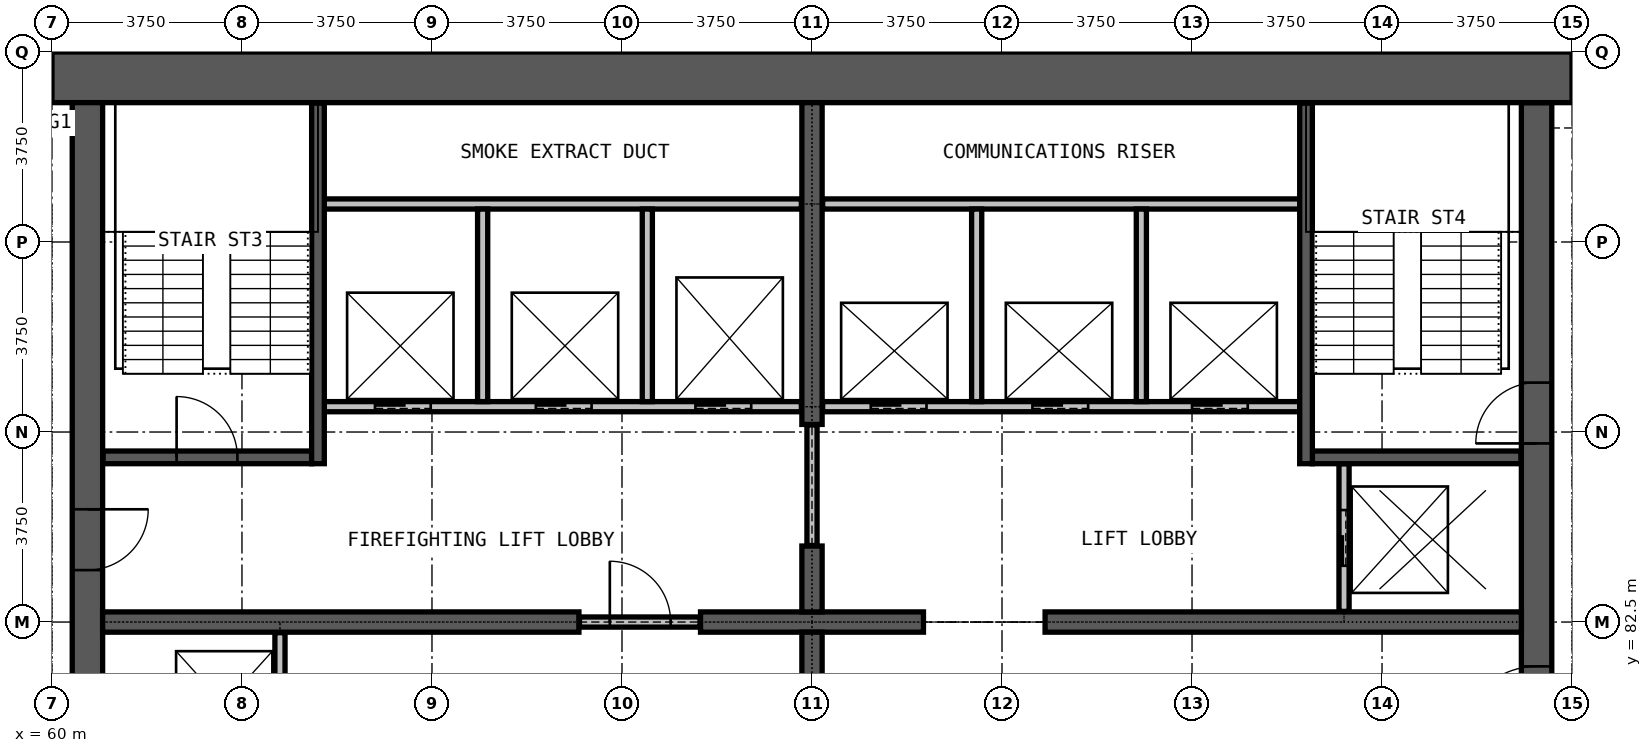
"""IFC4 building model, lengths in metres.
Left out: names, types, materials, properties, quantities, classifications, styles, units other than length and angle.
Written with IfcOpenShell. Run it as: python <this file> out.ifc"""

import sys

from ifc_helpers import new_model, si_unit, direction, frame, frame_2d, origin, place, context, subcontext, project, spatial, rectangle, extrude, element, fill, save


model = new_model("IFC4")
c1 = context("Model", 3, precision=1e-05, world=origin(), true_north=direction((0.0, 1.0)))
c2 = subcontext(c1, "Body", "Model", "MODEL_VIEW")
j1 = project(units=[si_unit("LENGTHUNIT", "METRE"), si_unit("PLANEANGLEUNIT", "RADIAN")], contexts=[c1])
p1 = place(None, origin())
s1 = spatial("IfcSite", under=j1, at=p1, CompositionType="ELEMENT")
p2 = place(p1, origin())
s2 = spatial("IfcBuilding", under=s1, at=p2, CompositionType="ELEMENT")
p3 = place(p2, frame((0.0, 0.0, 203.1)))
s3 = spatial("IfcBuildingStorey", under=s2, at=p3, CompositionType="ELEMENT", Elevation=203.1)
p4 = place(p3, frame((89.3, 72.25, 0.0), z_axis=(0.0, 0.0, 1.0), x_axis=(0.0, 1.0, 0.0)))
e1 = element("IfcWall", 1, at=p4, inside=s3, PredefinedType="SHEAR", context=c2, shape_type="SweptSolid", body=[
    extrude(rectangle(XDim=20.5, YDim=0.6, at=frame_2d((10.25, 0.0))), origin(), (0.0, 0.0, 1.0), 3.6),
])
p5 = place(p4, frame((0.275, 0.0, 0.0)))
e2 = element("IfcOpeningElement", 2, at=p5, cuts=e1, PredefinedType="OPENING", context=c2, shape_type="SweptSolid", body=[
    extrude(rectangle(XDim=1.2, YDim=2.2, at=frame_2d((0.6, 1.1))), frame((0.0, 0.31, 0.0), z_axis=(0.0, -1.0, 0.0), x_axis=(1.0, 0.0, 0.0)), (0.0, 0.0, 1.0), 0.62),
])
p6 = place(p4, frame((13.775, 0.0, 0.0)))
e3 = element("IfcOpeningElement", 3, at=p6, cuts=e1, PredefinedType="OPENING", context=c2, shape_type="SweptSolid", body=[
    extrude(rectangle(XDim=1.2, YDim=2.2, at=frame_2d((0.6, 1.1))), frame((0.0, 0.31, 0.0), z_axis=(0.0, -1.0, 0.0), x_axis=(1.0, 0.0, 0.0)), (0.0, 0.0, 1.0), 0.62),
])
p7 = place(p4, frame((7.875, 0.0, 0.0)))
e4 = element("IfcOpeningElement", 4, at=p7, cuts=e1, PredefinedType="OPENING", context=c2, shape_type="SweptSolid", body=[
    extrude(rectangle(XDim=1.5, YDim=2.2, at=frame_2d((0.75, 1.1))), frame((0.0, 0.31, 0.0), z_axis=(0.0, -1.0, 0.0), x_axis=(1.0, 0.0, 0.0)), (0.0, 0.0, 1.0), 0.62),
])
p8 = place(p3, frame((90.0, 93.25, 0.0), z_axis=(0.0, 0.0, 1.0), x_axis=(-1.0, 0.0, 0.0)))
e5 = element("IfcWall", 5, at=p8, inside=s3, PredefinedType="SHEAR", context=c2, shape_type="SweptSolid", body=[
    extrude(rectangle(XDim=30.0, YDim=1.0, at=frame_2d((15.0, 0.0))), origin(), (0.0, 0.0, 1.0), 3.6),
])
p9 = place(p3, frame((60.7, 92.75, 0.0), z_axis=(0.0, 0.0, 1.0), x_axis=(0.0, -1.0, 0.0)))
e6 = element("IfcWall", 6, at=p9, inside=s3, PredefinedType="SHEAR", context=c2, shape_type="SweptSolid", body=[
    extrude(rectangle(XDim=20.5, YDim=0.6, at=frame_2d((10.25, 0.0))), origin(), (0.0, 0.0, 1.0), 3.6),
])
p10 = place(p9, frame((19.025, 0.0, 0.0)))
e7 = element("IfcOpeningElement", 7, at=p10, cuts=e6, PredefinedType="OPENING", context=c2, shape_type="SweptSolid", body=[
    extrude(rectangle(XDim=1.2, YDim=2.2, at=frame_2d((0.6, 1.1))), frame((0.0, 0.31, 0.0), z_axis=(0.0, -1.0, 0.0), x_axis=(1.0, 0.0, 0.0)), (0.0, 0.0, 1.0), 0.62),
])
p11 = place(p9, frame((8.025, 0.0, 0.0)))
e8 = element("IfcOpeningElement", 8, at=p11, cuts=e6, PredefinedType="OPENING", context=c2, shape_type="SweptSolid", body=[
    extrude(rectangle(XDim=1.2, YDim=2.2, at=frame_2d((0.6, 1.1))), frame((0.0, 0.31, 0.0), z_axis=(0.0, -1.0, 0.0), x_axis=(1.0, 0.0, 0.0)), (0.0, 0.0, 1.0), 0.62),
])
p12 = place(p3, frame((61.0, 82.5, 0.0), z_axis=(0.0, 0.0, 1.0), x_axis=(1.0, 0.0, 0.0)))
e9 = element("IfcWall", 9, at=p12, inside=s3, PredefinedType="SHEAR", context=c2, shape_type="SweptSolid", body=[
    extrude(rectangle(XDim=9.4, YDim=0.4, at=frame_2d((4.7, 0.0))), origin(), (0.0, 0.0, 1.0), 3.6),
])
p13 = place(p3, frame((72.8, 82.5, 0.0), z_axis=(0.0, 0.0, 1.0), x_axis=(1.0, 0.0, 0.0)))
e10 = element("IfcWall", 10, at=p13, inside=s3, PredefinedType="SHEAR", context=c2, shape_type="SweptSolid", body=[
    extrude(rectangle(XDim=4.4, YDim=0.4, at=frame_2d((2.2, 0.0))), origin(), (0.0, 0.0, 1.0), 3.6),
])
p14 = place(p3, frame((79.6, 82.5, 0.0), z_axis=(0.0, 0.0, 1.0), x_axis=(1.0, 0.0, 0.0)))
e11 = element("IfcWall", 11, at=p14, inside=s3, PredefinedType="SHEAR", context=c2, shape_type="SweptSolid", body=[
    extrude(rectangle(XDim=9.4, YDim=0.4, at=frame_2d((4.7, 0.0))), origin(), (0.0, 0.0, 1.0), 3.6),
])
for number, where, z_axis, x_axis in (
    (12, (75.0, 81.0, 0.0), (0.0, 0.0, 1.0), (0.0, 1.0, 0.0)),
    (13, (75.0, 82.7, 0.0), (0.0, 0.0, 1.0), (0.0, 1.0, 0.0)),
):
    element("IfcWall", number, at=place(p3, frame(where, z_axis=z_axis, x_axis=x_axis)), inside=s3, PredefinedType="SHEAR", context=c2, shape_type="SweptSolid", body=[
        extrude(rectangle(XDim=1.3, YDim=0.4, at=frame_2d((0.65, 0.0))), origin(), (0.0, 0.0, 1.0), 3.6),
    ])
p15 = place(p3, frame((75.0, 86.4, 0.0), z_axis=(0.0, 0.0, 1.0), x_axis=(0.0, 1.0, 0.0)))
e14 = element("IfcWall", 14, at=p15, inside=s3, PredefinedType="SHEAR", context=c2, shape_type="SweptSolid", body=[
    extrude(rectangle(XDim=6.35, YDim=0.4, at=frame_2d((3.175, 0.0))), origin(), (0.0, 0.0, 1.0), 3.6),
])
p16 = place(p3, frame((70.41, 82.5, 0.0), z_axis=(0.0, 0.0, 1.0), x_axis=(1.0, 0.0, 0.0)))
e15 = element("IfcWall", 15, at=p16, inside=s3, PredefinedType="PARTITIONING", context=c2, shape_type="SweptSolid", body=[
    extrude(rectangle(XDim=2.38, YDim=0.2, at=frame_2d((1.19, 0.0))), origin(), (0.0, 0.0, 1.0), 2.4),
])
p17 = place(p16, frame((0.6, 0.0, 0.0)))
e16 = element("IfcOpeningElement", 16, at=p17, cuts=e15, PredefinedType="OPENING", context=c2, shape_type="SweptSolid", body=[
    extrude(rectangle(XDim=1.2, YDim=2.2, at=frame_2d((0.6, 1.1))), frame((0.0, 0.11, 0.0), z_axis=(0.0, -1.0, 0.0), x_axis=(1.0, 0.0, 0.0)), (0.0, 0.0, 1.0), 0.22),
])
p18 = place(p3, frame((75.0, 84.01, 0.0), z_axis=(0.0, 0.0, 1.0), x_axis=(0.0, 1.0, 0.0)))
e17 = element("IfcWall", 17, at=p18, inside=s3, PredefinedType="PARTITIONING", context=c2, shape_type="SweptSolid", body=[
    extrude(rectangle(XDim=2.38, YDim=0.2, at=frame_2d((1.19, 0.0))), origin(), (0.0, 0.0, 1.0), 2.4),
])
p19 = place(p3, frame((65.375, 86.75, 0.0), z_axis=(0.0, 0.0, 1.0), x_axis=(1.0, 0.0, 0.0)))
e18 = element("IfcWall", 18, at=p19, inside=s3, PredefinedType="PARTITIONING", context=c2, shape_type="SweptSolid", body=[
    extrude(rectangle(XDim=9.415, YDim=0.2, at=frame_2d((4.708, 0.0))), origin(), (0.0, 0.0, 1.0), 3.3),
])
p20 = place(p19, frame((1.0, 0.0, 0.0)))
e19 = element("IfcOpeningElement", 19, at=p20, cuts=e18, PredefinedType="OPENING", context=c2, shape_type="SweptSolid", body=[
    extrude(rectangle(XDim=1.1, YDim=2.2, at=frame_2d((0.55, 1.1))), frame((0.0, 0.11, 0.0), z_axis=(0.0, -1.0, 0.0), x_axis=(1.0, 0.0, 0.0)), (0.0, 0.0, 1.0), 0.22),
])
p21 = place(p19, frame((4.175, 0.0, 0.0)))
e20 = element("IfcOpeningElement", 20, at=p21, cuts=e18, PredefinedType="OPENING", context=c2, shape_type="SweptSolid", body=[
    extrude(rectangle(XDim=1.1, YDim=2.2, at=frame_2d((0.55, 1.1))), frame((0.0, 0.11, 0.0), z_axis=(0.0, -1.0, 0.0), x_axis=(1.0, 0.0, 0.0)), (0.0, 0.0, 1.0), 0.22),
])
p22 = place(p19, frame((7.325, 0.0, 0.0)))
e21 = element("IfcOpeningElement", 21, at=p22, cuts=e18, PredefinedType="OPENING", context=c2, shape_type="SweptSolid", body=[
    extrude(rectangle(XDim=1.1, YDim=2.2, at=frame_2d((0.55, 1.1))), frame((0.0, 0.11, 0.0), z_axis=(0.0, -1.0, 0.0), x_axis=(1.0, 0.0, 0.0)), (0.0, 0.0, 1.0), 0.22),
])
p23 = place(p3, frame((75.21, 86.75, 0.0), z_axis=(0.0, 0.0, 1.0), x_axis=(1.0, 0.0, 0.0)))
e22 = element("IfcWall", 22, at=p23, inside=s3, PredefinedType="PARTITIONING", context=c2, shape_type="SweptSolid", body=[
    extrude(rectangle(XDim=9.415, YDim=0.2, at=frame_2d((4.708, 0.0))), origin(), (0.0, 0.0, 1.0), 3.3),
])
p24 = place(p23, frame((0.95, 0.0, 0.0)))
e23 = element("IfcOpeningElement", 23, at=p24, cuts=e22, PredefinedType="OPENING", context=c2, shape_type="SweptSolid", body=[
    extrude(rectangle(XDim=1.1, YDim=2.2, at=frame_2d((0.55, 1.1))), frame((0.0, 0.11, 0.0), z_axis=(0.0, -1.0, 0.0), x_axis=(1.0, 0.0, 0.0)), (0.0, 0.0, 1.0), 0.22),
])
p25 = place(p23, frame((4.14, 0.0, 0.0)))
e24 = element("IfcOpeningElement", 24, at=p25, cuts=e22, PredefinedType="OPENING", context=c2, shape_type="SweptSolid", body=[
    extrude(rectangle(XDim=1.1, YDim=2.2, at=frame_2d((0.55, 1.1))), frame((0.0, 0.11, 0.0), z_axis=(0.0, -1.0, 0.0), x_axis=(1.0, 0.0, 0.0)), (0.0, 0.0, 1.0), 0.22),
])
p26 = place(p23, frame((7.29, 0.0, 0.0)))
e25 = element("IfcOpeningElement", 25, at=p26, cuts=e22, PredefinedType="OPENING", context=c2, shape_type="SweptSolid", body=[
    extrude(rectangle(XDim=1.1, YDim=2.2, at=frame_2d((0.55, 1.1))), frame((0.0, 0.11, 0.0), z_axis=(0.0, -1.0, 0.0), x_axis=(1.0, 0.0, 0.0)), (0.0, 0.0, 1.0), 0.22),
])
for number, where, z_axis, x_axis in (
    (26, (65.375, 90.75, 0.0), (0.0, 0.0, 1.0), (1.0, 0.0, 0.0)),
    (27, (75.21, 90.75, 0.0), (0.0, 0.0, 1.0), (1.0, 0.0, 0.0)),
):
    element("IfcWall", number, at=place(p3, frame(where, z_axis=z_axis, x_axis=x_axis)), inside=s3, PredefinedType="PARTITIONING", context=c2, shape_type="SweptSolid", body=[
        extrude(rectangle(XDim=9.415, YDim=0.2, at=frame_2d((4.708, 0.0))), origin(), (0.0, 0.0, 1.0), 3.3),
    ])
p27 = place(p3, frame((64.5, 79.375, 0.0), z_axis=(0.0, 0.0, 1.0), x_axis=(0.0, 1.0, 0.0)))
e28 = element("IfcWall", 28, at=p27, inside=s3, PredefinedType="PARTITIONING", context=c2, shape_type="SweptSolid", body=[
    extrude(rectangle(XDim=2.915, YDim=0.2, at=frame_2d((1.458, 0.0))), origin(), (0.0, 0.0, 1.0), 3.3),
])
for number, where, z_axis, x_axis in (
    (29, (68.5, 86.85, 0.0), (0.0, 0.0, 1.0), (0.0, 1.0, 0.0)),
    (30, (71.75, 86.85, 0.0), (0.0, 0.0, 1.0), (0.0, 1.0, 0.0)),
    (31, (78.25, 86.85, 0.0), (0.0, 0.0, 1.0), (0.0, 1.0, 0.0)),
    (32, (81.5, 86.85, 0.0), (0.0, 0.0, 1.0), (0.0, 1.0, 0.0)),
):
    element("IfcWall", number, at=place(p3, frame(where, z_axis=z_axis, x_axis=x_axis)), inside=s3, PredefinedType="PARTITIONING", context=c2, shape_type="SweptSolid", body=[
        extrude(rectangle(XDim=3.8, YDim=0.2, at=frame_2d((1.9, 0.0))), origin(), (0.0, 0.0, 1.0), 3.3),
    ])
p28 = place(p3, frame((85.5, 82.71, 0.0), z_axis=(0.0, 0.0, 1.0), x_axis=(0.0, 1.0, 0.0)))
e33 = element("IfcWall", 33, at=p28, inside=s3, PredefinedType="PARTITIONING", context=c2, shape_type="SweptSolid", body=[
    extrude(rectangle(XDim=2.915, YDim=0.2, at=frame_2d((1.458, 0.0))), origin(), (0.0, 0.0, 1.0), 3.3),
])
p29 = place(p28, frame((0.9, 0.0, 0.0)))
e34 = element("IfcOpeningElement", 34, at=p29, cuts=e33, PredefinedType="OPENING", context=c2, shape_type="SweptSolid", body=[
    extrude(rectangle(XDim=1.1, YDim=2.2, at=frame_2d((0.55, 1.1))), frame((0.0, 0.11, 0.0), z_axis=(0.0, -1.0, 0.0), x_axis=(1.0, 0.0, 0.0)), (0.0, 0.0, 1.0), 0.22),
])
p30 = place(p3, frame((61.01, 85.75, 0.0), z_axis=(0.0, 0.0, 1.0), x_axis=(1.0, 0.0, 0.0)))
e35 = element("IfcWall", 35, at=p30, inside=s3, PredefinedType="PARTITIONING", context=c2, shape_type="SweptSolid", body=[
    extrude(rectangle(XDim=4.115, YDim=0.25, at=frame_2d((2.058, 0.0))), origin(), (0.0, 0.0, 1.0), 3.3),
])
p31 = place(p30, frame((1.45, 0.0, 0.0)))
e36 = element("IfcOpeningElement", 36, at=p31, cuts=e35, PredefinedType="OPENING", context=c2, shape_type="SweptSolid", body=[
    extrude(rectangle(XDim=1.2, YDim=2.2, at=frame_2d((0.6, 1.1))), frame((0.0, 0.135, 0.0), z_axis=(0.0, -1.0, 0.0), x_axis=(1.0, 0.0, 0.0)), (0.0, 0.0, 1.0), 0.27),
])
p32 = place(p3, frame((84.875, 85.75, 0.0), z_axis=(0.0, 0.0, 1.0), x_axis=(1.0, 0.0, 0.0)))
e37 = element("IfcWall", 37, at=p32, inside=s3, PredefinedType="PARTITIONING", context=c2, shape_type="SweptSolid", body=[
    extrude(rectangle(XDim=4.115, YDim=0.25, at=frame_2d((2.058, 0.0))), origin(), (0.0, 0.0, 1.0), 3.3),
])
for number, where, z_axis, x_axis in (
    (38, (65.25, 85.625, 0.0), (0.0, 0.0, 1.0), (0.0, 1.0, 0.0)),
    (39, (84.75, 85.625, 0.0), (0.0, 0.0, 1.0), (0.0, 1.0, 0.0)),
):
    element("IfcWall", number, at=place(p3, frame(where, z_axis=z_axis, x_axis=x_axis)), inside=s3, PredefinedType="PARTITIONING", context=c2, shape_type="SweptSolid", body=[
        extrude(rectangle(XDim=7.115, YDim=0.25, at=frame_2d((3.558, 0.0))), origin(), (0.0, 0.0, 1.0), 3.3),
    ])
p33 = place(p24, origin())
e40 = element("IfcDoor", 40, at=p33, inside=s3, OperationType="DOUBLE_DOOR_SLIDING", PredefinedType="DOOR", context=c2, shape_type="SweptSolid", body=[
    extrude(rectangle(XDim=1.1, YDim=2.2, at=frame_2d((0.55, 1.1))), frame((0.0, 0.025, 0.0), z_axis=(0.0, -1.0, 0.0), x_axis=(1.0, 0.0, 0.0)), (0.0, 0.0, 1.0), 0.05),
])
fill(e23, e40)
p34 = place(p25, origin())
e41 = element("IfcDoor", 41, at=p34, inside=s3, OperationType="DOUBLE_DOOR_SLIDING", PredefinedType="DOOR", context=c2, shape_type="SweptSolid", body=[
    extrude(rectangle(XDim=1.1, YDim=2.2, at=frame_2d((0.55, 1.1))), frame((0.0, 0.025, 0.0), z_axis=(0.0, -1.0, 0.0), x_axis=(1.0, 0.0, 0.0)), (0.0, 0.0, 1.0), 0.05),
])
fill(e24, e41)
p35 = place(p26, origin())
e42 = element("IfcDoor", 42, at=p35, inside=s3, OperationType="DOUBLE_DOOR_SLIDING", PredefinedType="DOOR", context=c2, shape_type="SweptSolid", body=[
    extrude(rectangle(XDim=1.1, YDim=2.2, at=frame_2d((0.55, 1.1))), frame((0.0, 0.025, 0.0), z_axis=(0.0, -1.0, 0.0), x_axis=(1.0, 0.0, 0.0)), (0.0, 0.0, 1.0), 0.05),
])
fill(e25, e42)
p36 = place(p20, origin())
e43 = element("IfcDoor", 43, at=p36, inside=s3, OperationType="DOUBLE_DOOR_SLIDING", PredefinedType="DOOR", context=c2, shape_type="SweptSolid", body=[
    extrude(rectangle(XDim=1.1, YDim=2.2, at=frame_2d((0.55, 1.1))), frame((0.0, 0.025, 0.0), z_axis=(0.0, -1.0, 0.0), x_axis=(1.0, 0.0, 0.0)), (0.0, 0.0, 1.0), 0.05),
])
fill(e19, e43)
p37 = place(p21, origin())
e44 = element("IfcDoor", 44, at=p37, inside=s3, OperationType="DOUBLE_DOOR_SLIDING", PredefinedType="DOOR", context=c2, shape_type="SweptSolid", body=[
    extrude(rectangle(XDim=1.1, YDim=2.2, at=frame_2d((0.55, 1.1))), frame((0.0, 0.025, 0.0), z_axis=(0.0, -1.0, 0.0), x_axis=(1.0, 0.0, 0.0)), (0.0, 0.0, 1.0), 0.05),
])
fill(e20, e44)
p38 = place(p22, origin())
e45 = element("IfcDoor", 45, at=p38, inside=s3, OperationType="DOUBLE_DOOR_SLIDING", PredefinedType="DOOR", context=c2, shape_type="SweptSolid", body=[
    extrude(rectangle(XDim=1.1, YDim=2.2, at=frame_2d((0.55, 1.1))), frame((0.0, 0.025, 0.0), z_axis=(0.0, -1.0, 0.0), x_axis=(1.0, 0.0, 0.0)), (0.0, 0.0, 1.0), 0.05),
])
fill(e21, e45)
p39 = place(p29, origin())
e46 = element("IfcDoor", 46, at=p39, inside=s3, OperationType="DOUBLE_DOOR_SLIDING", PredefinedType="DOOR", context=c2, shape_type="SweptSolid", body=[
    extrude(rectangle(XDim=1.1, YDim=2.2, at=frame_2d((0.55, 1.1))), frame((0.0, 0.025, 0.0), z_axis=(0.0, -1.0, 0.0), x_axis=(1.0, 0.0, 0.0)), (0.0, 0.0, 1.0), 0.05),
])
fill(e34, e46)
p40 = place(p17, origin())
e47 = element("IfcDoor", 47, at=p40, inside=s3, OperationType="SINGLE_SWING_LEFT", PredefinedType="DOOR", context=c2, shape_type="SweptSolid", body=[
    extrude(rectangle(XDim=1.2, YDim=2.2, at=frame_2d((0.6, 1.1))), frame((0.0, 0.025, 0.0), z_axis=(0.0, -1.0, 0.0), x_axis=(1.0, 0.0, 0.0)), (0.0, 0.0, 1.0), 0.05),
])
fill(e16, e47)
p41 = place(p31, origin())
e48 = element("IfcDoor", 48, at=p41, inside=s3, OperationType="SINGLE_SWING_LEFT", PredefinedType="DOOR", context=c2, shape_type="SweptSolid", body=[
    extrude(rectangle(XDim=1.2, YDim=2.2, at=frame_2d((0.6, 1.1))), frame((0.0, 0.025, 0.0), z_axis=(0.0, -1.0, 0.0), x_axis=(1.0, 0.0, 0.0)), (0.0, 0.0, 1.0), 0.05),
])
fill(e36, e48)
p42 = place(p6, origin())
e49 = element("IfcDoor", 49, at=p42, inside=s3, OperationType="SINGLE_SWING_LEFT", PredefinedType="DOOR", context=c2, shape_type="SweptSolid", body=[
    extrude(rectangle(XDim=1.2, YDim=2.2, at=frame_2d((0.6, 1.1))), frame((0.0, 0.025, 0.0), z_axis=(0.0, -1.0, 0.0), x_axis=(1.0, 0.0, 0.0)), (0.0, 0.0, 1.0), 0.05),
])
fill(e3, e49)
p43 = place(p7, origin())
e50 = element("IfcDoor", 50, at=p43, inside=s3, OperationType="DOUBLE_DOOR_SINGLE_SWING", PredefinedType="DOOR", context=c2, shape_type="SweptSolid", body=[
    extrude(rectangle(XDim=1.5, YDim=2.2, at=frame_2d((0.75, 1.1))), frame((0.0, 0.025, 0.0), z_axis=(0.0, -1.0, 0.0), x_axis=(1.0, 0.0, 0.0)), (0.0, 0.0, 1.0), 0.05),
])
fill(e4, e50)
p44 = place(p11, origin())
e51 = element("IfcDoor", 51, at=p44, inside=s3, OperationType="SINGLE_SWING_LEFT", PredefinedType="DOOR", context=c2, shape_type="SweptSolid", body=[
    extrude(rectangle(XDim=1.2, YDim=2.2, at=frame_2d((0.6, 1.1))), frame((0.0, 0.025, 0.0), z_axis=(0.0, -1.0, 0.0), x_axis=(1.0, 0.0, 0.0)), (0.0, 0.0, 1.0), 0.05),
])
fill(e8, e51)
save(model, sys.argv[1])
